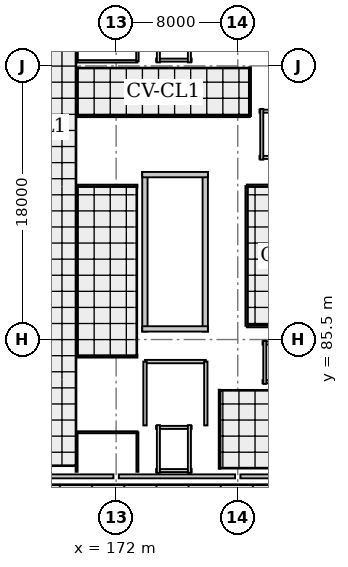
"""IFC4 building model, lengths in metres.
Left out: names, types, materials, properties, quantities, classifications, styles, units other than length and angle.
Written with IfcOpenShell. Run it as: python <this file> out.ifc"""

import sys

from ifc_helpers import new_model, si_unit, direction, frame, frame_2d, origin, origin_2d, place, context, subcontext, project, spatial, rectangle, i_section, extrude, element, fill, save


model = new_model("IFC4")
c1 = context("Model", 3, precision=1e-05, world=origin(), true_north=direction((0.0, 1.0)))
c2 = subcontext(c1, "Body", "Model", "MODEL_VIEW")
j1 = project(units=[si_unit("LENGTHUNIT", "METRE"), si_unit("PLANEANGLEUNIT", "RADIAN")], contexts=[c1])
p1 = place(None, origin())
s1 = spatial("IfcSite", under=j1, at=p1, CompositionType="ELEMENT")
p2 = place(p1, origin())
s2 = spatial("IfcBuilding", under=s1, at=p2, CompositionType="ELEMENT")
p3 = place(p2, frame((0.0, 0.0, 17.6)))
s3 = spatial("IfcBuildingStorey", under=s2, at=p3, CompositionType="ELEMENT", Elevation=17.6)
for number, where, z_axis, x_axis in (
    (1, (172.0, 76.5, 0.0), (0.0, 0.0, 1.0), (1.0, 0.0, 0.0)),
    (2, (172.0, 85.5, 0.0), (0.0, 0.0, 1.0), (1.0, 0.0, 0.0)),
    (3, (172.0, 94.5, 0.0), (0.0, 0.0, 1.0), (1.0, 0.0, 0.0)),
    (4, (172.0, 103.5, 0.0), (0.0, 0.0, 1.0), (1.0, 0.0, 0.0)),
    (5, (180.0, 76.5, 0.0), (0.0, 0.0, 1.0), (1.0, 0.0, 0.0)),
    (6, (180.0, 85.5, 0.0), (0.0, 0.0, 1.0), (1.0, 0.0, 0.0)),
    (7, (180.0, 94.5, 0.0), (0.0, 0.0, 1.0), (1.0, 0.0, 0.0)),
    (8, (180.0, 103.5, 0.0), (0.0, 0.0, 1.0), (1.0, 0.0, 0.0)),
):
    element("IfcColumn", number, at=place(p3, frame(where, z_axis=z_axis, x_axis=x_axis)), inside=s3, PredefinedType="COLUMN", context=c2, shape_type="SweptSolid", body=[
        extrude(i_section(OverallWidth=0.35, OverallDepth=0.35, WebThickness=0.012, FlangeThickness=0.019, FilletRadius=0.02, at=origin_2d()), origin(), (0.0, 0.0, 1.0), 3.2),
    ])
p4 = place(p3, frame((187.825, 76.5, 0.0), z_axis=(0.0, 0.0, 1.0), x_axis=(-1.0, 0.0, 0.0)))
e9 = element("IfcWall", 9, at=p4, inside=s3, PredefinedType="SOLIDWALL", context=c2, shape_type="SweptSolid", body=[
    extrude(rectangle(XDim=7.65, YDim=0.26, at=frame_2d((3.825, 0.0))), origin(), (0.0, 0.0, 1.0), 2.495),
])
p5 = place(p4, frame((3.125, 0.0, 0.75)))
e10 = element("IfcOpeningElement", 10, at=p5, cuts=e9, PredefinedType="OPENING", context=c2, shape_type="SweptSolid", body=[
    extrude(rectangle(XDim=1.4, YDim=1.55, at=frame_2d((0.7, 0.775))), frame((0.0, 0.14, 0.0), z_axis=(0.0, -1.0, 0.0), x_axis=(1.0, 0.0, 0.0)), (0.0, 0.0, 1.0), 0.28),
])
p6 = place(p3, frame((179.825, 76.5, 0.0), z_axis=(0.0, 0.0, 1.0), x_axis=(-1.0, 0.0, 0.0)))
e11 = element("IfcWall", 11, at=p6, inside=s3, PredefinedType="SOLIDWALL", context=c2, shape_type="SweptSolid", body=[
    extrude(rectangle(XDim=7.65, YDim=0.26, at=frame_2d((3.825, 0.0))), origin(), (0.0, 0.0, 1.0), 2.515),
])
p7 = place(p6, frame((3.125, 0.0, 0.75)))
e12 = element("IfcOpeningElement", 12, at=p7, cuts=e11, PredefinedType="OPENING", context=c2, shape_type="SweptSolid", body=[
    extrude(rectangle(XDim=1.4, YDim=1.55, at=frame_2d((0.7, 0.775))), frame((0.0, 0.14, 0.0), z_axis=(0.0, -1.0, 0.0), x_axis=(1.0, 0.0, 0.0)), (0.0, 0.0, 1.0), 0.28),
])
p8 = place(p3, frame((171.825, 76.5, 0.0), z_axis=(0.0, 0.0, 1.0), x_axis=(-1.0, 0.0, 0.0)))
e13 = element("IfcWall", 13, at=p8, inside=s3, PredefinedType="SOLIDWALL", context=c2, shape_type="SweptSolid", body=[
    extrude(rectangle(XDim=8.65, YDim=0.26, at=frame_2d((4.325, 0.0))), origin(), (0.0, 0.0, 1.0), 2.505),
])
p9 = place(p8, frame((3.078, 0.0, 0.0)))
e14 = element("IfcOpeningElement", 14, at=p9, cuts=e13, PredefinedType="OPENING", context=c2, shape_type="SweptSolid", body=[
    extrude(rectangle(XDim=1.4, YDim=2.25, at=frame_2d((0.7, 1.125))), frame((0.0, 0.14, 0.0), z_axis=(0.0, -1.0, 0.0), x_axis=(1.0, 0.0, 0.0)), (0.0, 0.0, 1.0), 0.28),
])
for number, where, z_axis, x_axis in (
    (15, (177.863, 86.025, 0.0), (0.0, 0.0, 1.0), (0.0, 1.0, 0.0)),
    (16, (173.893, 96.522, 0.0), (0.0, 0.0, 1.0), (0.0, -1.0, 0.0)),
):
    element("IfcWall", number, at=place(p3, frame(where, z_axis=z_axis, x_axis=x_axis)), inside=s3, PredefinedType="SHEAR", context=c2, shape_type="SweptSolid", body=[
        extrude(rectangle(XDim=10.498, YDim=0.35, at=frame_2d((5.249, 0.0))), origin(), (0.0, 0.0, 1.0), 2.98),
    ])
p10 = place(p3, frame((178.038, 96.347, 0.0), z_axis=(0.0, 0.0, 1.0), x_axis=(-1.0, 0.0, 0.0)))
e17 = element("IfcWall", 17, at=p10, inside=s3, PredefinedType="SHEAR", context=c2, shape_type="SweptSolid", body=[
    extrude(rectangle(XDim=4.32, YDim=0.35, at=frame_2d((2.16, 0.0))), origin(), (0.0, 0.0, 1.0), 2.98),
])
p11 = place(p3, frame((173.718, 86.2, 0.0), z_axis=(0.0, 0.0, 1.0), x_axis=(1.0, 0.0, 0.0)))
e18 = element("IfcWall", 18, at=p11, inside=s3, PredefinedType="SHEAR", context=c2, shape_type="SweptSolid", body=[
    extrude(rectangle(XDim=4.32, YDim=0.35, at=frame_2d((2.16, 0.0))), origin(), (0.0, 0.0, 1.0), 2.98),
])
p12 = place(p11, frame((1.15, 0.0, 0.0)))
e19 = element("IfcOpeningElement", 19, at=p12, cuts=e18, PredefinedType="OPENING", context=c2, shape_type="SweptSolid", body=[
    extrude(rectangle(XDim=1.3, YDim=2.1, at=frame_2d((0.65, 1.05))), frame((0.0, 0.185, 0.0), z_axis=(0.0, -1.0, 0.0), x_axis=(1.0, 0.0, 0.0)), (0.0, 0.0, 1.0), 0.37),
])
p13 = place(p3, frame((174.63, 76.88, 0.0), z_axis=(0.0, 0.0, 1.0), x_axis=(1.0, 0.0, 0.0)))
e20 = element("IfcWall", 20, at=p13, inside=s3, PredefinedType="SOLIDWALL", context=c2, shape_type="SweptSolid", body=[
    extrude(rectangle(XDim=2.34, YDim=0.2, at=frame_2d((1.17, 0.0))), origin(), (0.0, 0.0, 1.0), 2.515),
])
p14 = place(p3, frame((176.97, 79.72, 0.0), z_axis=(0.0, 0.0, 1.0), x_axis=(-1.0, 0.0, 0.0)))
e21 = element("IfcWall", 21, at=p14, inside=s3, PredefinedType="SOLIDWALL", context=c2, shape_type="SweptSolid", body=[
    extrude(rectangle(XDim=2.34, YDim=0.2, at=frame_2d((1.17, 0.0))), origin(), (0.0, 0.0, 1.0), 2.955),
])
p15 = place(p14, frame((0.57, 0.0, 0.0)))
e22 = element("IfcOpeningElement", 22, at=p15, cuts=e21, PredefinedType="OPENING", context=c2, shape_type="SweptSolid", body=[
    extrude(rectangle(XDim=1.2, YDim=2.15, at=frame_2d((0.6, 1.075))), frame((0.0, 0.11, 0.0), z_axis=(0.0, -1.0, 0.0), x_axis=(1.0, 0.0, 0.0)), (0.0, 0.0, 1.0), 0.22),
])
for number, where, z_axis, x_axis in (
    (23, (174.78, 79.87, 0.0), (0.0, 0.0, 1.0), (0.0, -1.0, 0.0)),
    (24, (176.82, 76.73, 0.0), (0.0, 0.0, 1.0), (0.0, 1.0, 0.0)),
):
    element("IfcWall", number, at=place(p3, frame(where, z_axis=z_axis, x_axis=x_axis)), inside=s3, PredefinedType="SOLIDWALL", context=c2, shape_type="SweptSolid", body=[
        extrude(rectangle(XDim=3.14, YDim=0.2, at=frame_2d((1.57, 0.0))), origin(), (0.0, 0.0, 1.0), 2.515),
    ])
p16 = place(p3, frame((174.63, 103.88, 0.0), z_axis=(0.0, 0.0, 1.0), x_axis=(1.0, 0.0, 0.0)))
e25 = element("IfcWall", 25, at=p16, inside=s3, PredefinedType="SOLIDWALL", context=c2, shape_type="SweptSolid", body=[
    extrude(rectangle(XDim=2.34, YDim=0.2, at=frame_2d((1.17, 0.0))), origin(), (0.0, 0.0, 1.0), 2.515),
])
for number, where, z_axis, x_axis in (
    (26, (174.78, 106.87, 0.0), (0.0, 0.0, 1.0), (0.0, -1.0, 0.0)),
    (27, (176.82, 103.73, 0.0), (0.0, 0.0, 1.0), (0.0, 1.0, 0.0)),
):
    element("IfcWall", number, at=place(p3, frame(where, z_axis=z_axis, x_axis=x_axis)), inside=s3, PredefinedType="SOLIDWALL", context=c2, shape_type="SweptSolid", body=[
        extrude(rectangle(XDim=3.14, YDim=0.2, at=frame_2d((1.57, 0.0))), origin(), (0.0, 0.0, 1.0), 2.515),
    ])
p17 = place(p3, frame((181.63, 82.73, 0.0), z_axis=(0.0, 0.0, 1.0), x_axis=(1.0, 0.0, 0.0)))
e28 = element("IfcWall", 28, at=p17, inside=s3, PredefinedType="SOLIDWALL", context=c2, shape_type="SweptSolid", body=[
    extrude(rectangle(XDim=2.34, YDim=0.2, at=frame_2d((1.17, 0.0))), origin(), (0.0, 0.0, 1.0), 2.955),
])
p18 = place(p3, frame((183.97, 85.27, 0.0), z_axis=(0.0, 0.0, 1.0), x_axis=(-1.0, 0.0, 0.0)))
e29 = element("IfcWall", 29, at=p18, inside=s3, PredefinedType="SOLIDWALL", context=c2, shape_type="SweptSolid", body=[
    extrude(rectangle(XDim=2.34, YDim=0.2, at=frame_2d((1.17, 0.0))), origin(), (0.0, 0.0, 1.0), 2.515),
])
p19 = place(p18, frame((0.62, 0.0, 0.0)))
e30 = element("IfcOpeningElement", 30, at=p19, cuts=e29, PredefinedType="OPENING", context=c2, shape_type="SweptSolid", body=[
    extrude(rectangle(XDim=1.1, YDim=2.15, at=frame_2d((0.55, 1.075))), frame((0.0, 0.11, 0.0), z_axis=(0.0, -1.0, 0.0), x_axis=(1.0, 0.0, 0.0)), (0.0, 0.0, 1.0), 0.22),
])
p20 = place(p3, frame((181.78, 85.42, 0.0), z_axis=(0.0, 0.0, 1.0), x_axis=(0.0, -1.0, 0.0)))
e31 = element("IfcWall", 31, at=p20, inside=s3, PredefinedType="SOLIDWALL", context=c2, shape_type="SweptSolid", body=[
    extrude(rectangle(XDim=2.84, YDim=0.2, at=frame_2d((1.42, 0.0))), origin(), (0.0, 0.0, 1.0), 2.515),
])
for number, where, z_axis, x_axis in (
    (32, (181.43, 97.48, 0.0), (0.0, 0.0, 1.0), (1.0, 0.0, 0.0)),
    (33, (184.17, 100.52, 0.0), (0.0, 0.0, 1.0), (-1.0, 0.0, 0.0)),
):
    element("IfcWall", number, at=place(p3, frame(where, z_axis=z_axis, x_axis=x_axis)), inside=s3, PredefinedType="SOLIDWALL", context=c2, shape_type="SweptSolid", body=[
        extrude(rectangle(XDim=2.74, YDim=0.2, at=frame_2d((1.37, 0.0))), origin(), (0.0, 0.0, 1.0), 2.955),
    ])
p21 = place(p3, frame((181.58, 100.67, 0.0), z_axis=(0.0, 0.0, 1.0), x_axis=(0.0, -1.0, 0.0)))
e34 = element("IfcWall", 34, at=p21, inside=s3, PredefinedType="SOLIDWALL", context=c2, shape_type="SweptSolid", body=[
    extrude(rectangle(XDim=3.34, YDim=0.2, at=frame_2d((1.67, 0.0))), origin(), (0.0, 0.0, 1.0), 2.955),
])
p22 = place(p21, frame((0.92, 0.0, 0.0)))
e35 = element("IfcOpeningElement", 35, at=p22, cuts=e34, PredefinedType="OPENING", context=c2, shape_type="SweptSolid", body=[
    extrude(rectangle(XDim=1.5, YDim=2.2, at=frame_2d((0.75, 1.1))), frame((0.0, 0.11, 0.0), z_axis=(0.0, -1.0, 0.0), x_axis=(1.0, 0.0, 0.0)), (0.0, 0.0, 1.0), 0.22),
])
p23 = place(p3, frame((180.8, 100.2, 0.0), z_axis=(0.0, 0.0, 1.0), x_axis=(-1.0, 0.0, 0.0)))
e36 = element("IfcWall", 36, at=p23, inside=s3, PredefinedType="PARTITIONING", context=c2, shape_type="SweptSolid", body=[
    extrude(rectangle(XDim=11.4, YDim=0.14, at=frame_2d((5.7, 0.0))), origin(), (0.0, 0.0, 1.0), 2.565),
])
p24 = place(p3, frame((169.4, 100.2, 0.0), z_axis=(0.0, 0.0, 1.0), x_axis=(0.0, 1.0, 0.0)))
e37 = element("IfcWall", 37, at=p24, inside=s3, PredefinedType="PARTITIONING", context=c2, shape_type="SweptSolid", body=[
    extrude(rectangle(XDim=3.2, YDim=0.14, at=frame_2d((1.6, 0.0))), origin(), (0.0, 0.0, 1.0), 2.515),
])
p25 = place(p24, frame((1.075, 0.0, 0.0)))
e38 = element("IfcOpeningElement", 38, at=p25, cuts=e37, PredefinedType="OPENING", context=c2, shape_type="SweptSolid", body=[
    extrude(rectangle(XDim=1.05, YDim=2.1, at=frame_2d((0.525, 1.05))), frame((0.0, 0.08, 0.0), z_axis=(0.0, -1.0, 0.0), x_axis=(1.0, 0.0, 0.0)), (0.0, 0.0, 1.0), 0.16),
])
p26 = place(p3, frame((180.8, 103.4, 0.0), z_axis=(0.0, 0.0, 1.0), x_axis=(0.0, -1.0, 0.0)))
e39 = element("IfcWall", 39, at=p26, inside=s3, PredefinedType="PARTITIONING", context=c2, shape_type="SweptSolid", body=[
    extrude(rectangle(XDim=3.2, YDim=0.14, at=frame_2d((1.6, 0.0))), origin(), (0.0, 0.0, 1.0), 2.355),
])
p27 = place(p3, frame((187.2, 86.4, 0.0), z_axis=(0.0, 0.0, 1.0), x_axis=(-1.0, 0.0, 0.0)))
e40 = element("IfcWall", 40, at=p27, inside=s3, PredefinedType="PARTITIONING", context=c2, shape_type="SweptSolid", body=[
    extrude(rectangle(XDim=6.6, YDim=0.19, at=frame_2d((3.3, 0.0))), origin(), (0.0, 0.0, 1.0), 2.495),
])
p28 = place(p3, frame((180.6, 95.6, 0.0), z_axis=(0.0, 0.0, 1.0), x_axis=(1.0, 0.0, 0.0)))
e41 = element("IfcWall", 41, at=p28, inside=s3, PredefinedType="PARTITIONING", context=c2, shape_type="SweptSolid", body=[
    extrude(rectangle(XDim=6.6, YDim=0.19, at=frame_2d((3.3, 0.0))), origin(), (0.0, 0.0, 1.0), 2.495),
])
p29 = place(p28, frame((2.775, 0.0, 0.0)))
e42 = element("IfcOpeningElement", 42, at=p29, cuts=e41, PredefinedType="OPENING", context=c2, shape_type="SweptSolid", body=[
    extrude(rectangle(XDim=1.05, YDim=2.1, at=frame_2d((0.525, 1.05))), frame((0.0, 0.105, 0.0), z_axis=(0.0, -1.0, 0.0), x_axis=(1.0, 0.0, 0.0)), (0.0, 0.0, 1.0), 0.21),
])
p30 = place(p3, frame((180.6, 86.4, 0.0), z_axis=(0.0, 0.0, 1.0), x_axis=(0.0, 1.0, 0.0)))
e43 = element("IfcWall", 43, at=p30, inside=s3, PredefinedType="PARTITIONING", context=c2, shape_type="SweptSolid", body=[
    extrude(rectangle(XDim=9.2, YDim=0.19, at=frame_2d((4.6, 0.0))), origin(), (0.0, 0.0, 1.0), 2.515),
])
for number, where, z_axis, x_axis in (
    (44, (173.4, 84.4, 0.0), (0.0, 0.0, 1.0), (-1.0, 0.0, 0.0)),
    (45, (169.4, 95.6, 0.0), (0.0, 0.0, 1.0), (1.0, 0.0, 0.0)),
):
    element("IfcWall", number, at=place(p3, frame(where, z_axis=z_axis, x_axis=x_axis)), inside=s3, PredefinedType="PARTITIONING", context=c2, shape_type="SweptSolid", body=[
        extrude(rectangle(XDim=4.0, YDim=0.175, at=frame_2d((2.0, 0.0))), origin(), (0.0, 0.0, 1.0), 2.565),
    ])
p31 = place(p3, frame((169.4, 84.4, 0.0), z_axis=(0.0, 0.0, 1.0), x_axis=(0.0, 1.0, 0.0)))
e46 = element("IfcWall", 46, at=p31, inside=s3, PredefinedType="PARTITIONING", context=c2, shape_type="SweptSolid", body=[
    extrude(rectangle(XDim=11.2, YDim=0.175, at=frame_2d((5.6, 0.0))), origin(), (0.0, 0.0, 1.0), 2.515),
])
p32 = place(p31, frame((5.075, 0.0, 0.0)))
e47 = element("IfcOpeningElement", 47, at=p32, cuts=e46, PredefinedType="OPENING", context=c2, shape_type="SweptSolid", body=[
    extrude(rectangle(XDim=1.05, YDim=2.1, at=frame_2d((0.525, 1.05))), frame((0.0, 0.097, 0.0), z_axis=(0.0, -1.0, 0.0), x_axis=(1.0, 0.0, 0.0)), (0.0, 0.0, 1.0), 0.195),
])
p33 = place(p3, frame((173.4, 103.8, 0.0), z_axis=(0.0, 0.0, 1.0), x_axis=(-1.0, 0.0, 0.0)))
e48 = element("IfcWall", 48, at=p33, inside=s3, PredefinedType="PARTITIONING", context=c2, shape_type="SweptSolid", body=[
    extrude(rectangle(XDim=4.0, YDim=0.16, at=frame_2d((2.0, 0.0))), origin(), (0.0, 0.0, 1.0), 2.355),
])
p34 = place(p3, frame((169.4, 103.8, 0.0), z_axis=(0.0, 0.0, 1.0), x_axis=(0.0, 1.0, 0.0)))
e49 = element("IfcWall", 49, at=p34, inside=s3, PredefinedType="PARTITIONING", context=c2, shape_type="SweptSolid", body=[
    extrude(rectangle(XDim=2.8, YDim=0.16, at=frame_2d((1.4, 0.0))), origin(), (0.0, 0.0, 1.0), 2.515),
])
p35 = place(p34, frame((0.875, 0.0, 0.0)))
e50 = element("IfcOpeningElement", 50, at=p35, cuts=e49, PredefinedType="OPENING", context=c2, shape_type="SweptSolid", body=[
    extrude(rectangle(XDim=1.05, YDim=2.1, at=frame_2d((0.525, 1.05))), frame((0.0, 0.09, 0.0), z_axis=(0.0, -1.0, 0.0), x_axis=(1.0, 0.0, 0.0)), (0.0, 0.0, 1.0), 0.18),
])
p36 = place(p3, frame((173.4, 106.6, 0.0), z_axis=(0.0, 0.0, 1.0), x_axis=(0.0, -1.0, 0.0)))
e51 = element("IfcWall", 51, at=p36, inside=s3, PredefinedType="PARTITIONING", context=c2, shape_type="SweptSolid", body=[
    extrude(rectangle(XDim=2.8, YDim=0.16, at=frame_2d((1.4, 0.0))), origin(), (0.0, 0.0, 1.0), 2.515),
])
p37 = place(p3, frame((169.4, 79.4, 0.0), z_axis=(0.0, 0.0, 1.0), x_axis=(1.0, 0.0, 0.0)))
e52 = element("IfcWall", 52, at=p37, inside=s3, PredefinedType="PARTITIONING", context=c2, shape_type="SweptSolid", body=[
    extrude(rectangle(XDim=4.0, YDim=0.13, at=frame_2d((2.0, 0.0))), origin(), (0.0, 0.0, 1.0), 2.565),
])
p38 = place(p3, frame((169.4, 76.8, 0.0), z_axis=(0.0, 0.0, 1.0), x_axis=(0.0, 1.0, 0.0)))
e53 = element("IfcWall", 53, at=p38, inside=s3, PredefinedType="PARTITIONING", context=c2, shape_type="SweptSolid", body=[
    extrude(rectangle(XDim=2.6, YDim=0.13, at=frame_2d((1.3, 0.0))), origin(), (0.0, 0.0, 1.0), 2.515),
])
p39 = place(p38, frame((0.79, 0.0, 0.0)))
e54 = element("IfcOpeningElement", 54, at=p39, cuts=e53, PredefinedType="OPENING", context=c2, shape_type="SweptSolid", body=[
    extrude(rectangle(XDim=1.02, YDim=2.05, at=frame_2d((0.51, 1.025))), frame((0.0, 0.075, 0.0), z_axis=(0.0, -1.0, 0.0), x_axis=(1.0, 0.0, 0.0)), (0.0, 0.0, 1.0), 0.15),
])
p40 = place(p3, frame((173.4, 79.4, 0.0), z_axis=(0.0, 0.0, 1.0), x_axis=(0.0, -1.0, 0.0)))
e55 = element("IfcWall", 55, at=p40, inside=s3, PredefinedType="PARTITIONING", context=c2, shape_type="SweptSolid", body=[
    extrude(rectangle(XDim=2.6, YDim=0.13, at=frame_2d((1.3, 0.0))), origin(), (0.0, 0.0, 1.0), 2.515),
])
p41 = place(p3, frame((178.8, 77.0, 0.0), z_axis=(0.0, 0.0, 1.0), x_axis=(0.0, 1.0, 0.0)))
e56 = element("IfcWall", 56, at=p41, inside=s3, PredefinedType="PARTITIONING", context=c2, shape_type="SweptSolid", body=[
    extrude(rectangle(XDim=5.2, YDim=0.1, at=frame_2d((2.6, 0.0))), origin(), (0.0, 0.0, 1.0), 2.515),
])
p42 = place(p41, frame((2.075, 0.0, 0.0)))
e57 = element("IfcOpeningElement", 57, at=p42, cuts=e56, PredefinedType="OPENING", context=c2, shape_type="SweptSolid", body=[
    extrude(rectangle(XDim=1.05, YDim=2.1, at=frame_2d((0.525, 1.05))), frame((0.0, 0.06, 0.0), z_axis=(0.0, -1.0, 0.0), x_axis=(1.0, 0.0, 0.0)), (0.0, 0.0, 1.0), 0.12),
])
p43 = place(p3, frame((173.9, 84.05, 0.0), z_axis=(0.0, 0.0, 1.0), x_axis=(1.0, 0.0, 0.0)))
e58 = element("IfcWall", 58, at=p43, inside=s3, PredefinedType="SOLIDWALL", context=c2, shape_type="SweptSolid", body=[
    extrude(rectangle(XDim=4.0, YDim=0.22, at=frame_2d((2.0, 0.0))), origin(), (0.0, 0.0, 1.0), 2.955),
])
p44 = place(p3, frame((173.9, 79.85, 0.0), z_axis=(0.0, 0.0, 1.0), x_axis=(0.0, 1.0, 0.0)))
e59 = element("IfcWall", 59, at=p44, inside=s3, PredefinedType="SOLIDWALL", context=c2, shape_type="SweptSolid", body=[
    extrude(rectangle(XDim=4.2, YDim=0.22, at=frame_2d((2.1, 0.0))), origin(), (0.0, 0.0, 1.0), 2.955),
])
p45 = place(p44, frame((1.4, 0.0, 0.0)))
e60 = element("IfcOpeningElement", 60, at=p45, cuts=e59, PredefinedType="OPENING", context=c2, shape_type="SweptSolid", body=[
    extrude(rectangle(XDim=1.4, YDim=2.1, at=frame_2d((0.7, 1.05))), frame((0.0, 0.12, 0.0), z_axis=(0.0, -1.0, 0.0), x_axis=(1.0, 0.0, 0.0)), (0.0, 0.0, 1.0), 0.24),
])
p46 = place(p3, frame((177.9, 84.05, 0.0), z_axis=(0.0, 0.0, 1.0), x_axis=(0.0, -1.0, 0.0)))
e61 = element("IfcWall", 61, at=p46, inside=s3, PredefinedType="SOLIDWALL", context=c2, shape_type="SweptSolid", body=[
    extrude(rectangle(XDim=4.2, YDim=0.22, at=frame_2d((2.1, 0.0))), origin(), (0.0, 0.0, 1.0), 2.955),
])
p47 = place(p7, origin())
e62 = element("IfcWindow", 62, at=p47, inside=s3, PartitioningType="SINGLE_PANEL", PredefinedType="WINDOW", context=c2, shape_type="SweptSolid", body=[
    extrude(rectangle(XDim=1.4, YDim=1.55, at=frame_2d((0.7, 0.775))), frame((0.0, 0.03, 0.0), z_axis=(0.0, -1.0, 0.0), x_axis=(1.0, 0.0, 0.0)), (0.0, 0.0, 1.0), 0.06),
])
fill(e12, e62)
p48 = place(p9, origin())
e63 = element("IfcDoor", 63, at=p48, inside=s3, OperationType="SINGLE_SWING_RIGHT", PredefinedType="DOOR", context=c2, shape_type="SweptSolid", body=[
    extrude(rectangle(XDim=1.4, YDim=2.25, at=frame_2d((0.7, 1.125))), frame((0.0, 0.025, 0.0), z_axis=(0.0, -1.0, 0.0), x_axis=(1.0, 0.0, 0.0)), (0.0, 0.0, 1.0), 0.05),
])
fill(e14, e63)
p49 = place(p12, origin())
e64 = element("IfcDoor", 64, at=p49, inside=s3, OperationType="SINGLE_SWING_RIGHT", PredefinedType="DOOR", context=c2, shape_type="SweptSolid", body=[
    extrude(rectangle(XDim=1.3, YDim=2.1, at=frame_2d((0.65, 1.05))), frame((0.0, 0.025, 0.0), z_axis=(0.0, -1.0, 0.0), x_axis=(1.0, 0.0, 0.0)), (0.0, 0.0, 1.0), 0.05),
])
fill(e19, e64)
p50 = place(p15, origin())
e65 = element("IfcDoor", 65, at=p50, inside=s3, OperationType="SLIDING_TO_LEFT", PredefinedType="DOOR", context=c2, shape_type="SweptSolid", body=[
    extrude(rectangle(XDim=1.2, YDim=2.15, at=frame_2d((0.6, 1.075))), frame((0.0, 0.025, 0.0), z_axis=(0.0, -1.0, 0.0), x_axis=(1.0, 0.0, 0.0)), (0.0, 0.0, 1.0), 0.05),
])
fill(e22, e65)
p51 = place(p22, origin())
e66 = element("IfcDoor", 66, at=p51, inside=s3, OperationType="SLIDING_TO_LEFT", PredefinedType="DOOR", context=c2, shape_type="SweptSolid", body=[
    extrude(rectangle(XDim=1.5, YDim=2.2, at=frame_2d((0.75, 1.1))), frame((0.0, 0.025, 0.0), z_axis=(0.0, -1.0, 0.0), x_axis=(1.0, 0.0, 0.0)), (0.0, 0.0, 1.0), 0.05),
])
fill(e35, e66)
p52 = place(p25, origin())
e67 = element("IfcDoor", 67, at=p52, inside=s3, OperationType="SINGLE_SWING_RIGHT", PredefinedType="DOOR", context=c2, shape_type="SweptSolid", body=[
    extrude(rectangle(XDim=1.05, YDim=2.1, at=frame_2d((0.525, 1.05))), frame((0.0, 0.025, 0.0), z_axis=(0.0, -1.0, 0.0), x_axis=(1.0, 0.0, 0.0)), (0.0, 0.0, 1.0), 0.05),
])
fill(e38, e67)
p53 = place(p32, origin())
e68 = element("IfcDoor", 68, at=p53, inside=s3, OperationType="SINGLE_SWING_LEFT", PredefinedType="DOOR", context=c2, shape_type="SweptSolid", body=[
    extrude(rectangle(XDim=1.05, YDim=2.1, at=frame_2d((0.525, 1.05))), frame((0.0, 0.025, 0.0), z_axis=(0.0, -1.0, 0.0), x_axis=(1.0, 0.0, 0.0)), (0.0, 0.0, 1.0), 0.05),
])
fill(e47, e68)
p54 = place(p39, origin())
e69 = element("IfcDoor", 69, at=p54, inside=s3, OperationType="SINGLE_SWING_LEFT", PredefinedType="DOOR", context=c2, shape_type="SweptSolid", body=[
    extrude(rectangle(XDim=1.02, YDim=2.05, at=frame_2d((0.51, 1.025))), frame((0.0, 0.025, 0.0), z_axis=(0.0, -1.0, 0.0), x_axis=(1.0, 0.0, 0.0)), (0.0, 0.0, 1.0), 0.05),
])
fill(e54, e69)
p55 = place(p42, origin())
e70 = element("IfcDoor", 70, at=p55, inside=s3, OperationType="SINGLE_SWING_LEFT", PredefinedType="DOOR", context=c2, shape_type="SweptSolid", body=[
    extrude(rectangle(XDim=1.05, YDim=2.1, at=frame_2d((0.525, 1.05))), frame((0.0, 0.025, 0.0), z_axis=(0.0, -1.0, 0.0), x_axis=(1.0, 0.0, 0.0)), (0.0, 0.0, 1.0), 0.05),
])
fill(e57, e70)
p56 = place(p45, origin())
e71 = element("IfcDoor", 71, at=p56, inside=s3, OperationType="SINGLE_SWING_LEFT", PredefinedType="DOOR", context=c2, shape_type="SweptSolid", body=[
    extrude(rectangle(XDim=1.4, YDim=2.1, at=frame_2d((0.7, 1.05))), frame((0.0, 0.025, 0.0), z_axis=(0.0, -1.0, 0.0), x_axis=(1.0, 0.0, 0.0)), (0.0, 0.0, 1.0), 0.05),
])
fill(e60, e71)
save(model, sys.argv[1])
